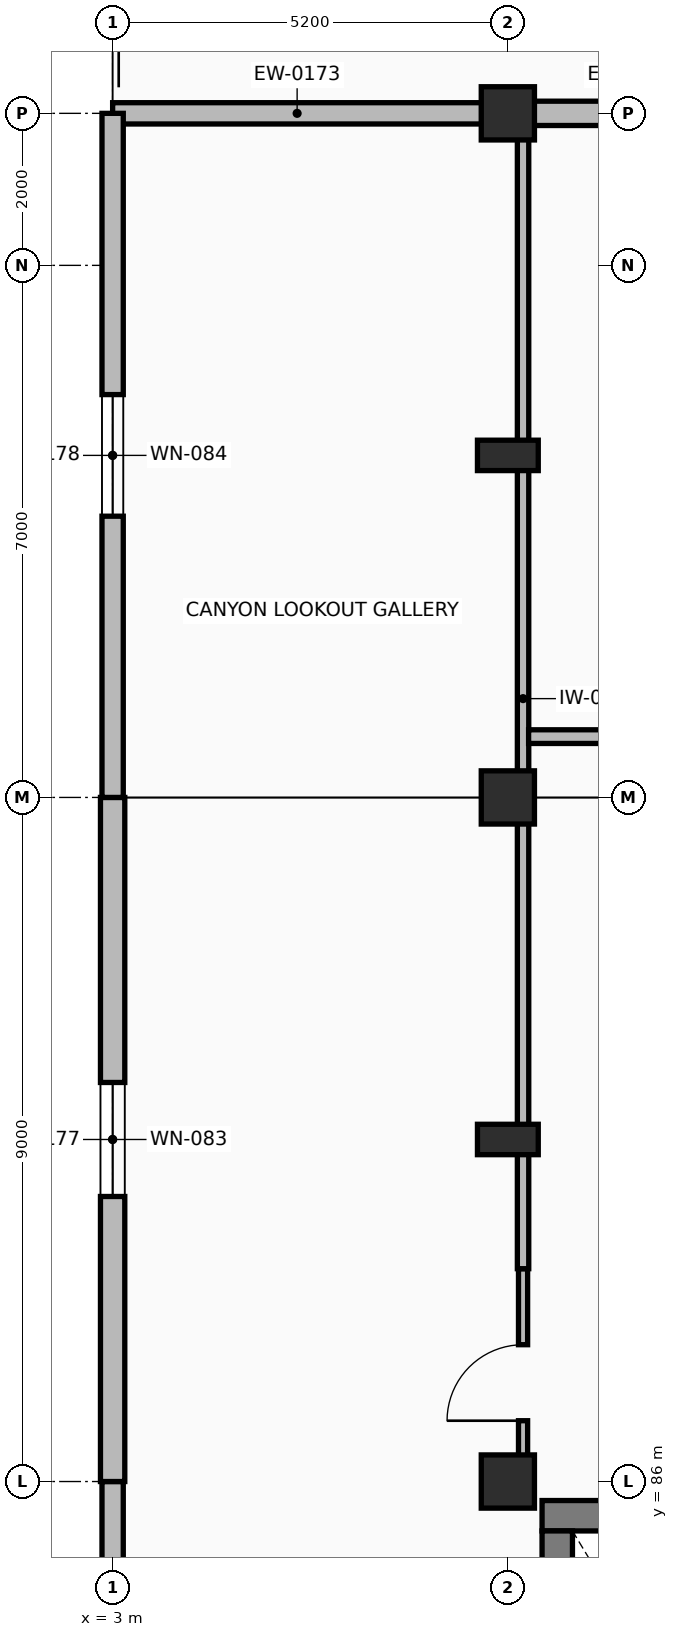
"""IFC4 building model, lengths in metres.
Left out: names, types, materials, properties, quantities, classifications, styles, units other than length and angle.
Written with IfcOpenShell. Run it as: python <this file> out.ifc"""

import sys

from ifc_helpers import new_model, si_unit, direction, frame, frame_2d, origin, origin_2d, place, context, subcontext, project, spatial, rectangle, extrude, element, fill, save


model = new_model("IFC4")
c1 = context("Model", 3, precision=1e-05, world=origin(), true_north=direction((0.0, 1.0)))
c2 = subcontext(c1, "Body", "Model", "MODEL_VIEW")
j1 = project(units=[si_unit("LENGTHUNIT", "METRE"), si_unit("PLANEANGLEUNIT", "RADIAN")], contexts=[c1])
p1 = place(None, origin())
s1 = spatial("IfcSite", under=j1, at=p1, CompositionType="ELEMENT")
p2 = place(p1, origin())
s2 = spatial("IfcBuilding", under=s1, at=p2, CompositionType="ELEMENT")
p3 = place(p2, frame((0.0, 0.0, 18.9)))
s3 = spatial("IfcBuildingStorey", under=s2, at=p3, CompositionType="ELEMENT", Elevation=18.9)
for number, where, z_axis, x_axis in (
    (1, (8.2, 86.0, 0.0), (0.0, 0.0, 1.0), (1.0, 0.0, 0.0)),
    (2, (8.2, 95.0, 0.0), (0.0, 0.0, 1.0), (1.0, 0.0, 0.0)),
    (3, (8.2, 104.0, 0.0), (0.0, 0.0, 1.0), (1.0, 0.0, 0.0)),
):
    element("IfcColumn", number, at=place(p3, frame(where, z_axis=z_axis, x_axis=x_axis)), inside=s3, PredefinedType="COLUMN", context=c2, shape_type="SweptSolid", body=[
        extrude(rectangle(XDim=0.7, YDim=0.7, at=origin_2d()), origin(), (0.0, 0.0, 1.0), 4.5),
    ])
for number, where, z_axis, x_axis in (
    (4, (8.2, 90.5, 0.0), (0.0, 0.0, 1.0), (0.0, 1.0, 0.0)),
    (5, (8.2, 99.5, 0.0), (0.0, 0.0, 1.0), (0.0, 1.0, 0.0)),
):
    element("IfcColumn", number, at=place(p3, frame(where, z_axis=z_axis, x_axis=x_axis)), inside=s3, PredefinedType="PILASTER", context=c2, shape_type="SweptSolid", body=[
        extrude(rectangle(XDim=0.4, YDim=0.8, at=origin_2d()), origin(), (0.0, 0.0, 1.0), 4.5),
    ])
p4 = place(p3, frame((7.855, 104.0, 0.0), z_axis=(0.0, 0.0, 1.0), x_axis=(-1.0, 0.0, 0.0)))
e6 = element("IfcWall", 6, at=p4, inside=s3, PredefinedType="SOLIDWALL", context=c2, shape_type="SweptSolid", body=[
    extrude(rectangle(XDim=4.855, YDim=0.28, at=frame_2d((2.427, 0.0))), origin(), (0.0, 0.0, 1.0), 4.19),
])
p5 = place(p3, frame((16.855, 104.0, 0.0), z_axis=(0.0, 0.0, 1.0), x_axis=(-1.0, 0.0, 0.0)))
e7 = element("IfcWall", 7, at=p5, inside=s3, PredefinedType="SOLIDWALL", context=c2, shape_type="SweptSolid", body=[
    extrude(rectangle(XDim=8.31, YDim=0.32, at=frame_2d((4.155, 0.0))), origin(), (0.0, 0.0, 1.0), 4.19),
])
p6 = place(p5, frame((3.355, 0.0, 0.0)))
e8 = element("IfcOpeningElement", 8, at=p6, cuts=e7, PredefinedType="OPENING", context=c2, shape_type="SweptSolid", body=[
    extrude(rectangle(XDim=1.6, YDim=2.3, at=frame_2d((0.8, 1.15))), frame((0.0, 0.17, 0.0), z_axis=(0.0, -1.0, 0.0), x_axis=(1.0, 0.0, 0.0)), (0.0, 0.0, 1.0), 0.34),
])
p7 = place(p3, frame((3.0, 86.0, 0.0), z_axis=(0.0, 0.0, 1.0), x_axis=(0.0, -1.0, 0.0)))
e9 = element("IfcWall", 9, at=p7, inside=s3, PredefinedType="SOLIDWALL", context=c2, shape_type="SweptSolid", body=[
    extrude(rectangle(XDim=9.0, YDim=0.28, at=frame_2d((4.5, 0.0))), origin(), (0.0, 0.0, 1.0), 4.19),
])
p8 = place(p7, frame((3.8, 0.0, 0.9)))
e10 = element("IfcOpeningElement", 10, at=p8, cuts=e9, PredefinedType="OPENING", context=c2, shape_type="SweptSolid", body=[
    extrude(rectangle(XDim=1.4, YDim=1.5, at=frame_2d((0.7, 0.75))), frame((0.0, 0.15, 0.0), z_axis=(0.0, -1.0, 0.0), x_axis=(1.0, 0.0, 0.0)), (0.0, 0.0, 1.0), 0.3),
])
p9 = place(p3, frame((3.0, 95.0, 0.0), z_axis=(0.0, 0.0, 1.0), x_axis=(0.0, -1.0, 0.0)))
e11 = element("IfcWall", 11, at=p9, inside=s3, PredefinedType="SOLIDWALL", context=c2, shape_type="SweptSolid", body=[
    extrude(rectangle(XDim=9.0, YDim=0.32, at=frame_2d((4.5, 0.0))), origin(), (0.0, 0.0, 1.0), 4.19),
])
p10 = place(p9, frame((3.75, 0.0, 0.9)))
e12 = element("IfcOpeningElement", 12, at=p10, cuts=e11, PredefinedType="OPENING", context=c2, shape_type="SweptSolid", body=[
    extrude(rectangle(XDim=1.5, YDim=1.5, at=frame_2d((0.75, 0.75))), frame((0.0, 0.17, 0.0), z_axis=(0.0, -1.0, 0.0), x_axis=(1.0, 0.0, 0.0)), (0.0, 0.0, 1.0), 0.34),
])
p11 = place(p3, frame((3.0, 104.0, 0.0), z_axis=(0.0, 0.0, 1.0), x_axis=(0.0, -1.0, 0.0)))
e13 = element("IfcWall", 13, at=p11, inside=s3, PredefinedType="SOLIDWALL", context=c2, shape_type="SweptSolid", body=[
    extrude(rectangle(XDim=9.0, YDim=0.28, at=frame_2d((4.5, 0.0))), origin(), (0.0, 0.0, 1.0), 4.19),
])
p12 = place(p11, frame((3.7, 0.0, 0.9)))
e14 = element("IfcOpeningElement", 14, at=p12, cuts=e13, PredefinedType="OPENING", context=c2, shape_type="SweptSolid", body=[
    extrude(rectangle(XDim=1.6, YDim=1.55, at=frame_2d((0.8, 0.775))), frame((0.0, 0.15, 0.0), z_axis=(0.0, -1.0, 0.0), x_axis=(1.0, 0.0, 0.0)), (0.0, 0.0, 1.0), 0.3),
])
p13 = place(p3, frame((13.05, 85.55, 0.0), z_axis=(0.0, 0.0, 1.0), x_axis=(-1.0, 0.0, 0.0)))
e15 = element("IfcWall", 15, at=p13, inside=s3, PredefinedType="SHEAR", context=c2, shape_type="SweptSolid", body=[
    extrude(rectangle(XDim=4.4, YDim=0.4, at=frame_2d((2.2, 0.0))), origin(), (0.0, 0.0, 1.0), 4.28),
])
p14 = place(p3, frame((8.85, 85.35, 0.0), z_axis=(0.0, 0.0, 1.0), x_axis=(0.0, -1.0, 0.0)))
e16 = element("IfcWall", 16, at=p14, inside=s3, PredefinedType="SHEAR", context=c2, shape_type="SweptSolid", body=[
    extrude(rectangle(XDim=7.6, YDim=0.4, at=frame_2d((3.8, 0.0))), origin(), (0.0, 0.0, 1.0), 4.28),
])
p15 = place(p3, frame((8.4, 85.8, 0.0), z_axis=(0.0, 0.0, 1.0), x_axis=(0.0, 1.0, 0.0)))
e17 = element("IfcWall", 17, at=p15, inside=s3, PredefinedType="PARTITIONING", context=c2, shape_type="SweptSolid", body=[
    extrude(rectangle(XDim=3.0, YDim=0.12, at=frame_2d((1.5, 0.0))), origin(), (0.0, 0.0, 1.0), 4.135),
])
p16 = place(p15, frame((1.0, 0.0, 0.0)))
e18 = element("IfcOpeningElement", 18, at=p16, cuts=e17, PredefinedType="OPENING", context=c2, shape_type="SweptSolid", body=[
    extrude(rectangle(XDim=1.0, YDim=2.15, at=frame_2d((0.5, 1.075))), frame((0.0, 0.07, 0.0), z_axis=(0.0, -1.0, 0.0), x_axis=(1.0, 0.0, 0.0)), (0.0, 0.0, 1.0), 0.14),
])
p17 = place(p3, frame((8.4, 88.8, 0.0), z_axis=(0.0, 0.0, 1.0), x_axis=(0.0, 1.0, 0.0)))
e19 = element("IfcWall", 19, at=p17, inside=s3, PredefinedType="PARTITIONING", context=c2, shape_type="SweptSolid", body=[
    extrude(rectangle(XDim=15.0, YDim=0.15, at=frame_2d((7.5, 0.0))), origin(), (0.0, 0.0, 1.0), 4.135),
])
p18 = place(p3, frame((8.473, 95.8, 0.0), z_axis=(0.0, 0.0, 1.0), x_axis=(1.0, 0.0, 0.0)))
e20 = element("IfcWall", 20, at=p18, inside=s3, PredefinedType="STANDARD", context=c2, shape_type="SweptSolid", body=[
    extrude(rectangle(XDim=11.527, YDim=0.18, at=frame_2d((5.764, 0.0))), origin(), (0.0, 0.0, 1.0), 4.135),
])
p19 = place(p18, frame((5.263, 0.0, 0.0)))
e21 = element("IfcOpeningElement", 21, at=p19, cuts=e20, PredefinedType="OPENING", context=c2, shape_type="SweptSolid", body=[
    extrude(rectangle(XDim=1.0, YDim=2.15, at=frame_2d((0.5, 1.075))), frame((0.0, 0.1, 0.0), z_axis=(0.0, -1.0, 0.0), x_axis=(1.0, 0.0, 0.0)), (0.0, 0.0, 1.0), 0.2),
])
p20 = place(p10, origin())
e22 = element("IfcWindow", 22, at=p20, inside=s3, PartitioningType="SINGLE_PANEL", PredefinedType="WINDOW", context=c2, shape_type="SweptSolid", body=[
    extrude(rectangle(XDim=1.5, YDim=1.5, at=frame_2d((0.75, 0.75))), frame((0.0, 0.03, 0.0), z_axis=(0.0, -1.0, 0.0), x_axis=(1.0, 0.0, 0.0)), (0.0, 0.0, 1.0), 0.06),
])
fill(e12, e22)
p21 = place(p12, origin())
e23 = element("IfcWindow", 23, at=p21, inside=s3, PartitioningType="SINGLE_PANEL", PredefinedType="WINDOW", context=c2, shape_type="SweptSolid", body=[
    extrude(rectangle(XDim=1.6, YDim=1.55, at=frame_2d((0.8, 0.775))), frame((0.0, 0.03, 0.0), z_axis=(0.0, -1.0, 0.0), x_axis=(1.0, 0.0, 0.0)), (0.0, 0.0, 1.0), 0.06),
])
fill(e14, e23)
p22 = place(p16, origin())
e24 = element("IfcDoor", 24, at=p22, inside=s3, OperationType="SINGLE_SWING_LEFT", PredefinedType="DOOR", context=c2, shape_type="SweptSolid", body=[
    extrude(rectangle(XDim=1.0, YDim=2.15, at=frame_2d((0.5, 1.075))), frame((0.0, 0.025, 0.0), z_axis=(0.0, -1.0, 0.0), x_axis=(1.0, 0.0, 0.0)), (0.0, 0.0, 1.0), 0.05),
])
fill(e18, e24)
save(model, sys.argv[1])
